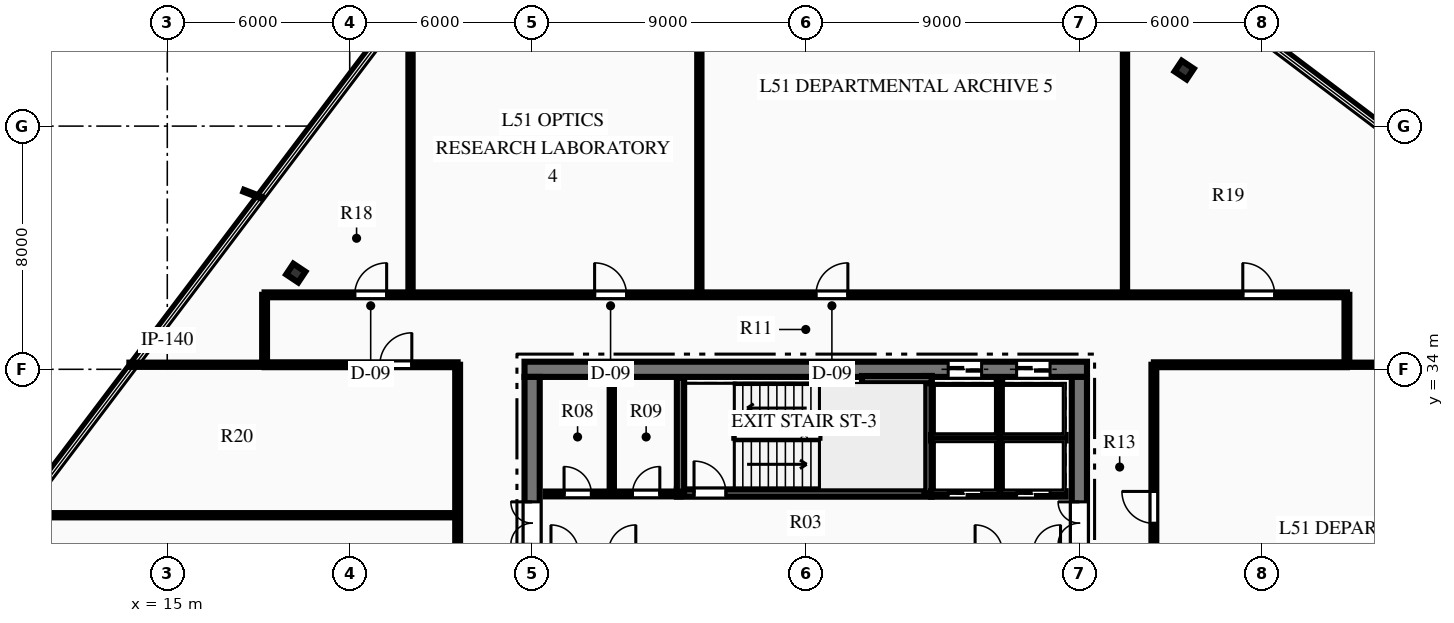
"""IFC4 building model, lengths in metres.
Left out: names, types, materials, properties, quantities, classifications, styles, units other than length and angle.
Written with IfcOpenShell. Run it as: python <this file> out.ifc"""

import sys

from ifc_helpers import new_model, si_unit, direction, frame, frame_2d, origin, origin_2d, place, context, subcontext, project, spatial, rectangle, i_section, extrude, element, fill, save


model = new_model("IFC4")
c1 = context("Model", 3, precision=1e-05, world=origin(), true_north=direction((0.0, 1.0)))
c2 = subcontext(c1, "Body", "Model", "MODEL_VIEW")
j1 = project(units=[si_unit("LENGTHUNIT", "METRE"), si_unit("PLANEANGLEUNIT", "RADIAN")], contexts=[c1])
p1 = place(None, origin())
s1 = spatial("IfcSite", under=j1, at=p1, CompositionType="ELEMENT")
p2 = place(p1, origin())
s2 = spatial("IfcBuilding", under=s1, at=p2, CompositionType="ELEMENT")
p3 = place(p2, frame((0.0, 0.0, 205.95)))
s3 = spatial("IfcBuildingStorey", under=s2, at=p3, CompositionType="ELEMENT", Elevation=205.95)
p4 = place(p3, frame((26.75, 34.0, 0.0), z_axis=(0.0, 0.0, 1.0), x_axis=(1.0, 0.0, 0.0)))
e1 = element("IfcWall", 1, at=p4, inside=s3, PredefinedType="SHEAR", context=c2, shape_type="SweptSolid", body=[
    extrude(rectangle(XDim=18.5, YDim=0.5, at=frame_2d((9.25, 0.0))), origin(), (0.0, 0.0, 1.0), 3.75),
])
p5 = place(p4, frame((13.935, 0.0, 0.0)))
e2 = element("IfcOpeningElement", 2, at=p5, cuts=e1, PredefinedType="OPENING", context=c2, shape_type="SweptSolid", body=[
    extrude(rectangle(XDim=1.1, YDim=2.15, at=frame_2d((0.55, 1.075))), frame((0.0, 0.26, 0.0), z_axis=(0.0, -1.0, 0.0), x_axis=(1.0, 0.0, 0.0)), (0.0, 0.0, 1.0), 0.52),
])
p6 = place(p4, frame((16.185, 0.0, 0.0)))
e3 = element("IfcOpeningElement", 3, at=p6, cuts=e1, PredefinedType="OPENING", context=c2, shape_type="SweptSolid", body=[
    extrude(rectangle(XDim=1.1, YDim=2.15, at=frame_2d((0.55, 1.075))), frame((0.0, 0.26, 0.0), z_axis=(0.0, -1.0, 0.0), x_axis=(1.0, 0.0, 0.0)), (0.0, 0.0, 1.0), 0.52),
])
p7 = place(p3, frame((27.0, 18.25, 0.0), z_axis=(0.0, 0.0, 1.0), x_axis=(0.0, 1.0, 0.0)))
e4 = element("IfcWall", 4, at=p7, inside=s3, PredefinedType="SHEAR", context=c2, shape_type="SweptSolid", body=[
    extrude(rectangle(XDim=15.5, YDim=0.5, at=frame_2d((7.75, 0.0))), origin(), (0.0, 0.0, 1.0), 3.75),
])
p8 = place(p7, frame((9.99, 0.0, 0.0)))
e5 = element("IfcOpeningElement", 5, at=p8, cuts=e4, PredefinedType="OPENING", context=c2, shape_type="SweptSolid", body=[
    extrude(rectangle(XDim=1.4, YDim=2.2, at=frame_2d((0.7, 1.1))), frame((0.0, 0.26, 0.0), z_axis=(0.0, -1.0, 0.0), x_axis=(1.0, 0.0, 0.0)), (0.0, 0.0, 1.0), 0.52),
])
p9 = place(p3, frame((45.0, 18.25, 0.0), z_axis=(0.0, 0.0, 1.0), x_axis=(0.0, 1.0, 0.0)))
e6 = element("IfcWall", 6, at=p9, inside=s3, PredefinedType="SHEAR", context=c2, shape_type="SweptSolid", body=[
    extrude(rectangle(XDim=15.5, YDim=0.5, at=frame_2d((7.75, 0.0))), origin(), (0.0, 0.0, 1.0), 3.75),
])
p10 = place(p9, frame((9.99, 0.0, 0.0)))
e7 = element("IfcOpeningElement", 7, at=p10, cuts=e6, PredefinedType="OPENING", context=c2, shape_type="SweptSolid", body=[
    extrude(rectangle(XDim=1.4, YDim=2.2, at=frame_2d((0.7, 1.1))), frame((0.0, 0.26, 0.0), z_axis=(0.0, -1.0, 0.0), x_axis=(1.0, 0.0, 0.0)), (0.0, 0.0, 1.0), 0.52),
])
p11 = place(p3, frame((31.76, 29.93, 0.0), z_axis=(0.0, 0.0, 1.0), x_axis=(1.0, 0.0, 0.0)))
e8 = element("IfcWall", 8, at=p11, inside=s3, PredefinedType="SHEAR", context=c2, shape_type="SweptSolid", body=[
    extrude(rectangle(XDim=8.38, YDim=0.24, at=frame_2d((4.19, 0.0))), origin(), (0.0, 0.0, 1.0), 3.75),
])
p12 = place(p11, frame((0.565, 0.0, 0.0)))
e9 = element("IfcOpeningElement", 9, at=p12, cuts=e8, PredefinedType="OPENING", context=c2, shape_type="SweptSolid", body=[
    extrude(rectangle(XDim=1.05, YDim=2.15, at=frame_2d((0.525, 1.075))), frame((0.0, 0.13, 0.0), z_axis=(0.0, -1.0, 0.0), x_axis=(1.0, 0.0, 0.0)), (0.0, 0.0, 1.0), 0.26),
])
p13 = place(p3, frame((31.88, 29.93, 0.0), z_axis=(0.0, 0.0, 1.0), x_axis=(0.0, 1.0, 0.0)))
e10 = element("IfcWall", 10, at=p13, inside=s3, PredefinedType="SHEAR", context=c2, shape_type="SweptSolid", body=[
    extrude(rectangle(XDim=3.79, YDim=0.24, at=frame_2d((1.895, 0.0))), origin(), (0.0, 0.0, 1.0), 3.75),
])
p14 = place(p3, frame((40.02, 29.93, 0.0), z_axis=(0.0, 0.0, 1.0), x_axis=(0.0, 1.0, 0.0)))
e11 = element("IfcWall", 11, at=p14, inside=s3, PredefinedType="SHEAR", context=c2, shape_type="SweptSolid", body=[
    extrude(rectangle(XDim=3.85, YDim=0.24, at=frame_2d((1.925, 0.0))), origin(), (0.0, 0.0, 1.0), 3.75),
])
p15 = place(p3, frame((37.85, 33.66, 0.0), z_axis=(0.0, 0.0, 1.0), x_axis=(1.0, 0.0, 0.0)))
e12 = element("IfcWall", 12, at=p15, inside=s3, PredefinedType="SHEAR", context=c2, shape_type="SweptSolid", body=[
    extrude(rectangle(XDim=2.29, YDim=0.24, at=frame_2d((1.145, 0.0))), origin(), (0.0, 0.0, 1.0), 3.75),
])
for number, where, z_axis, x_axis in (
    (13, (48.448, 43.842, 0.0), (0.0, 0.0, 1.0), (0.554, 0.832, 0.0)),
    (14, (19.226, 37.166, 0.0), (0.0, 0.0, 1.0), (0.554, 0.832, 0.0)),
):
    element("IfcColumn", number, at=place(p3, frame(where, z_axis=z_axis, x_axis=x_axis)), inside=s3, PredefinedType="COLUMN", context=c2, shape_type="SweptSolid", body=[
        extrude(i_section(OverallWidth=0.424, OverallDepth=0.474, WebThickness=0.048, FlangeThickness=0.077, at=origin_2d()), origin(), (0.0, 0.0, 1.0), 3.75),
    ])
p16 = place(p3, frame((27.45, 29.9, 0.0), z_axis=(0.0, 0.0, 1.0), x_axis=(1.0, 0.0, 0.0)))
e15 = element("IfcWall", 15, at=p16, inside=s3, PredefinedType="PARTITIONING", context=c2, shape_type="SweptSolid", body=[
    extrude(rectangle(XDim=4.43, YDim=0.16, at=frame_2d((2.215, 0.0))), origin(), (0.0, 0.0, 1.0), 3.47),
])
p17 = place(p16, frame((0.6, 0.0, 0.0)))
e16 = element("IfcOpeningElement", 16, at=p17, cuts=e15, PredefinedType="OPENING", context=c2, shape_type="SweptSolid", body=[
    extrude(rectangle(XDim=0.9, YDim=2.15, at=frame_2d((0.45, 1.075))), frame((0.0, 0.09, 0.0), z_axis=(0.0, -1.0, 0.0), x_axis=(1.0, 0.0, 0.0)), (0.0, 0.0, 1.0), 0.18),
])
p18 = place(p16, frame((2.85, 0.0, 0.0)))
e17 = element("IfcOpeningElement", 17, at=p18, cuts=e15, PredefinedType="OPENING", context=c2, shape_type="SweptSolid", body=[
    extrude(rectangle(XDim=0.9, YDim=2.15, at=frame_2d((0.45, 1.075))), frame((0.0, 0.09, 0.0), z_axis=(0.0, -1.0, 0.0), x_axis=(1.0, 0.0, 0.0)), (0.0, 0.0, 1.0), 0.18),
])
p19 = place(p3, frame((29.62, 29.95, 0.0), z_axis=(0.0, 0.0, 1.0), x_axis=(0.0, 1.0, 0.0)))
e18 = element("IfcWall", 18, at=p19, inside=s3, PredefinedType="PARTITIONING", context=c2, shape_type="SweptSolid", body=[
    extrude(rectangle(XDim=3.6, YDim=0.14, at=frame_2d((1.8, 0.0))), origin(), (0.0, 0.0, 1.0), 3.47),
])
p20 = place(p3, frame((40.12, 29.9, 0.0), z_axis=(0.0, 0.0, 1.0), x_axis=(1.0, 0.0, 0.0)))
e19 = element("IfcWall", 19, at=p20, inside=s3, PredefinedType="PARTITIONING", context=c2, shape_type="SweptSolid", body=[
    extrude(rectangle(XDim=4.43, YDim=0.18, at=frame_2d((2.215, 0.0))), origin(), (0.0, 0.0, 1.0), 3.47),
])
p21 = place(p20, frame((0.565, 0.0, 0.0)))
e20 = element("IfcOpeningElement", 20, at=p21, cuts=e19, PredefinedType="OPENING", context=c2, shape_type="SweptSolid", body=[
    extrude(rectangle(XDim=1.1, YDim=2.15, at=frame_2d((0.55, 1.075))), frame((0.0, 0.1, 0.0), z_axis=(0.0, -1.0, 0.0), x_axis=(1.0, 0.0, 0.0)), (0.0, 0.0, 1.0), 0.2),
])
p22 = place(p20, frame((2.815, 0.0, 0.0)))
e21 = element("IfcOpeningElement", 21, at=p22, cuts=e19, PredefinedType="OPENING", context=c2, shape_type="SweptSolid", body=[
    extrude(rectangle(XDim=1.1, YDim=2.15, at=frame_2d((0.55, 1.075))), frame((0.0, 0.1, 0.0), z_axis=(0.0, -1.0, 0.0), x_axis=(1.0, 0.0, 0.0)), (0.0, 0.0, 1.0), 0.2),
])
p23 = place(p3, frame((40.12, 31.75, 0.0), z_axis=(0.0, 0.0, 1.0), x_axis=(1.0, 0.0, 0.0)))
e22 = element("IfcWall", 22, at=p23, inside=s3, PredefinedType="PARTITIONING", context=c2, shape_type="SweptSolid", body=[
    extrude(rectangle(XDim=4.43, YDim=0.18, at=frame_2d((2.215, 0.0))), origin(), (0.0, 0.0, 1.0), 3.47),
])
p24 = place(p3, frame((42.37, 29.9, 0.0), z_axis=(0.0, 0.0, 1.0), x_axis=(0.0, 1.0, 0.0)))
e23 = element("IfcWall", 23, at=p24, inside=s3, PredefinedType="PARTITIONING", context=c2, shape_type="SweptSolid", body=[
    extrude(rectangle(XDim=3.75, YDim=0.18, at=frame_2d((1.875, 0.0))), origin(), (0.0, 0.0, 1.0), 3.47),
])
p25 = place(p3, frame((18.2, 36.45, 0.0), z_axis=(0.0, 0.0, 1.0), x_axis=(1.0, 0.0, 0.0)))
e24 = element("IfcWall", 24, at=p25, inside=s3, PredefinedType="PARTITIONING", context=c2, shape_type="SweptSolid", body=[
    extrude(rectangle(XDim=35.6, YDim=0.16, at=frame_2d((17.8, 0.0))), origin(), (0.0, 0.0, 1.0), 2.849),
])
p26 = place(p25, frame((2.965, 0.0, 0.0)))
e25 = element("IfcOpeningElement", 25, at=p26, cuts=e24, PredefinedType="OPENING", context=c2, shape_type="SweptSolid", body=[
    extrude(rectangle(XDim=1.05, YDim=2.15, at=frame_2d((0.525, 1.075))), frame((0.0, 0.09, 0.0), z_axis=(0.0, -1.0, 0.0), x_axis=(1.0, 0.0, 0.0)), (0.0, 0.0, 1.0), 0.18),
])
p27 = place(p25, frame((10.855, 0.0, 0.0)))
e26 = element("IfcOpeningElement", 26, at=p27, cuts=e24, PredefinedType="OPENING", context=c2, shape_type="SweptSolid", body=[
    extrude(rectangle(XDim=1.05, YDim=2.15, at=frame_2d((0.525, 1.075))), frame((0.0, 0.09, 0.0), z_axis=(0.0, -1.0, 0.0), x_axis=(1.0, 0.0, 0.0)), (0.0, 0.0, 1.0), 0.18),
])
p28 = place(p25, frame((18.135, 0.0, 0.0)))
e27 = element("IfcOpeningElement", 27, at=p28, cuts=e24, PredefinedType="OPENING", context=c2, shape_type="SweptSolid", body=[
    extrude(rectangle(XDim=1.05, YDim=2.15, at=frame_2d((0.525, 1.075))), frame((0.0, 0.09, 0.0), z_axis=(0.0, -1.0, 0.0), x_axis=(1.0, 0.0, 0.0)), (0.0, 0.0, 1.0), 0.18),
])
p29 = place(p25, frame((32.175, 0.0, 0.0)))
e28 = element("IfcOpeningElement", 28, at=p29, cuts=e24, PredefinedType="OPENING", context=c2, shape_type="SweptSolid", body=[
    extrude(rectangle(XDim=1.05, YDim=2.15, at=frame_2d((0.525, 1.075))), frame((0.0, 0.09, 0.0), z_axis=(0.0, -1.0, 0.0), x_axis=(1.0, 0.0, 0.0)), (0.0, 0.0, 1.0), 0.18),
])
p30 = place(p3, frame((18.2, 34.15, 0.0), z_axis=(0.0, 0.0, 1.0), x_axis=(1.0, 0.0, 0.0)))
e29 = element("IfcWall", 29, at=p30, inside=s3, PredefinedType="PARTITIONING", context=c2, shape_type="SweptSolid", body=[
    extrude(rectangle(XDim=6.35, YDim=0.16, at=frame_2d((3.175, 0.0))), origin(), (0.0, 0.0, 1.0), 3.47),
])
p31 = place(p30, frame((3.793, 0.0, 0.0)))
e30 = element("IfcOpeningElement", 30, at=p31, cuts=e29, PredefinedType="OPENING", context=c2, shape_type="SweptSolid", body=[
    extrude(rectangle(XDim=1.05, YDim=2.15, at=frame_2d((0.525, 1.075))), frame((0.0, 0.09, 0.0), z_axis=(0.0, -1.0, 0.0), x_axis=(1.0, 0.0, 0.0)), (0.0, 0.0, 1.0), 0.18),
])
p32 = place(p3, frame((47.45, 34.15, 0.0), z_axis=(0.0, 0.0, 1.0), x_axis=(1.0, 0.0, 0.0)))
e31 = element("IfcWall", 31, at=p32, inside=s3, PredefinedType="PARTITIONING", context=c2, shape_type="SweptSolid", body=[
    extrude(rectangle(XDim=6.35, YDim=0.16, at=frame_2d((3.175, 0.0))), origin(), (0.0, 0.0, 1.0), 3.47),
])
p33 = place(p3, frame((24.55, 17.85, 0.0), z_axis=(0.0, 0.0, 1.0), x_axis=(0.0, 1.0, 0.0)))
e32 = element("IfcWall", 32, at=p33, inside=s3, PredefinedType="PARTITIONING", context=c2, shape_type="SweptSolid", body=[
    extrude(rectangle(XDim=16.3, YDim=0.16, at=frame_2d((8.15, 0.0))), origin(), (0.0, 0.0, 1.0), 3.47),
])
p34 = place(p33, frame((6.149, 0.0, 0.0)))
e33 = element("IfcOpeningElement", 33, at=p34, cuts=e32, PredefinedType="OPENING", context=c2, shape_type="SweptSolid", body=[
    extrude(rectangle(XDim=1.05, YDim=2.15, at=frame_2d((0.525, 1.075))), frame((0.0, 0.09, 0.0), z_axis=(0.0, -1.0, 0.0), x_axis=(1.0, 0.0, 0.0)), (0.0, 0.0, 1.0), 0.18),
])
p35 = place(p3, frame((47.45, 27.25, 0.0), z_axis=(0.0, 0.0, 1.0), x_axis=(0.0, 1.0, 0.0)))
e34 = element("IfcWall", 34, at=p35, inside=s3, PredefinedType="PARTITIONING", context=c2, shape_type="SweptSolid", body=[
    extrude(rectangle(XDim=6.9, YDim=0.16, at=frame_2d((3.45, 0.0))), origin(), (0.0, 0.0, 1.0), 3.47),
])
p36 = place(p35, frame((1.683, 0.0, 0.0)))
e35 = element("IfcOpeningElement", 35, at=p36, cuts=e34, PredefinedType="OPENING", context=c2, shape_type="SweptSolid", body=[
    extrude(rectangle(XDim=1.05, YDim=2.15, at=frame_2d((0.525, 1.075))), frame((0.0, 0.09, 0.0), z_axis=(0.0, -1.0, 0.0), x_axis=(1.0, 0.0, 0.0)), (0.0, 0.0, 1.0), 0.18),
])
for number, where, z_axis, x_axis in (
    (36, (18.2, 34.15, 0.0), (0.0, 0.0, 1.0), (0.0, 1.0, 0.0)),
    (37, (53.8, 34.15, 0.0), (0.0, 0.0, 1.0), (0.0, 1.0, 0.0)),
):
    element("IfcWall", number, at=place(p3, frame(where, z_axis=z_axis, x_axis=x_axis)), inside=s3, PredefinedType="PARTITIONING", context=c2, shape_type="SweptSolid", body=[
        extrude(rectangle(XDim=2.3, YDim=0.16, at=frame_2d((1.15, 0.0))), origin(), (0.0, 0.0, 1.0), 3.47),
    ])
p37 = place(p3, frame((13.753, 34.15, 0.0), z_axis=(0.0, 0.0, 1.0), x_axis=(1.0, 0.0, 0.0)))
e38 = element("IfcWall", 38, at=p37, inside=s3, PredefinedType="PARTITIONING", context=c2, shape_type="SweptSolid", body=[
    extrude(rectangle(XDim=4.447, YDim=0.14, at=frame_2d((2.224, 0.0))), origin(), (0.0, 0.0, 1.0), 3.47),
])
p38 = place(p3, frame((53.8, 34.15, 0.0), z_axis=(0.0, 0.0, 1.0), x_axis=(1.0, 0.0, 0.0)))
e39 = element("IfcWall", 39, at=p38, inside=s3, PredefinedType="PARTITIONING", context=c2, shape_type="SweptSolid", body=[
    extrude(rectangle(XDim=11.642, YDim=0.14, at=frame_2d((5.821, 0.0))), origin(), (0.0, 0.0, 1.0), 3.47),
])
p39 = place(p3, frame((23.0, 36.45, 0.0), z_axis=(0.0, 0.0, 1.0), x_axis=(0.0, 1.0, 0.0)))
e40 = element("IfcWall", 40, at=p39, inside=s3, PredefinedType="PARTITIONING", context=c2, shape_type="SweptSolid", body=[
    extrude(rectangle(XDim=9.927, YDim=0.14, at=frame_2d((4.963, 0.0))), origin(), (0.0, 0.0, 1.0), 3.47),
])
p40 = place(p3, frame((32.5, 36.45, 0.0), z_axis=(0.0, 0.0, 1.0), x_axis=(0.0, 1.0, 0.0)))
e41 = element("IfcWall", 41, at=p40, inside=s3, PredefinedType="PARTITIONING", context=c2, shape_type="SweptSolid", body=[
    extrude(rectangle(XDim=17.724, YDim=0.14, at=frame_2d((8.862, 0.0))), origin(), (0.0, 0.0, 1.0), 2.849),
])
p41 = place(p3, frame((46.5, 36.45, 0.0), z_axis=(0.0, 0.0, 1.0), x_axis=(0.0, 1.0, 0.0)))
e42 = element("IfcWall", 42, at=p41, inside=s3, PredefinedType="PARTITIONING", context=c2, shape_type="SweptSolid", body=[
    extrude(rectangle(XDim=12.026, YDim=0.14, at=frame_2d((6.013, 0.0))), origin(), (0.0, 0.0, 1.0), 2.849),
])
p42 = place(p3, frame((10.009, 29.2, 0.0), z_axis=(0.0, 0.0, 1.0), x_axis=(1.0, 0.0, 0.0)))
e43 = element("IfcWall", 43, at=p42, inside=s3, PredefinedType="PARTITIONING", context=c2, shape_type="SweptSolid", body=[
    extrude(rectangle(XDim=14.541, YDim=0.14, at=frame_2d((7.271, 0.0))), origin(), (0.0, 0.0, 1.0), 3.47),
])
p43 = place(p17, origin())
e44 = element("IfcDoor", 44, at=p43, inside=s3, OperationType="SINGLE_SWING_LEFT", PredefinedType="DOOR", context=c2, shape_type="SweptSolid", body=[
    extrude(rectangle(XDim=0.9, YDim=2.15, at=frame_2d((0.45, 1.075))), frame((0.0, 0.025, 0.0), z_axis=(0.0, -1.0, 0.0), x_axis=(1.0, 0.0, 0.0)), (0.0, 0.0, 1.0), 0.05),
])
fill(e16, e44)
p44 = place(p18, origin())
e45 = element("IfcDoor", 45, at=p44, inside=s3, OperationType="SINGLE_SWING_RIGHT", PredefinedType="DOOR", context=c2, shape_type="SweptSolid", body=[
    extrude(rectangle(XDim=0.9, YDim=2.15, at=frame_2d((0.45, 1.075))), frame((0.0, 0.025, 0.0), z_axis=(0.0, -1.0, 0.0), x_axis=(1.0, 0.0, 0.0)), (0.0, 0.0, 1.0), 0.05),
])
fill(e17, e45)
p45 = place(p12, origin())
e46 = element("IfcDoor", 46, at=p45, inside=s3, OperationType="SINGLE_SWING_LEFT", PredefinedType="DOOR", context=c2, shape_type="SweptSolid", body=[
    extrude(rectangle(XDim=1.05, YDim=2.15, at=frame_2d((0.525, 1.075))), frame((0.0, 0.025, 0.0), z_axis=(0.0, -1.0, 0.0), x_axis=(1.0, 0.0, 0.0)), (0.0, 0.0, 1.0), 0.05),
])
fill(e9, e46)
p46 = place(p8, origin())
e47 = element("IfcDoor", 47, at=p46, inside=s3, OperationType="DOUBLE_DOOR_SINGLE_SWING", PredefinedType="DOOR", context=c2, shape_type="SweptSolid", body=[
    extrude(rectangle(XDim=1.4, YDim=2.2, at=frame_2d((0.7, 1.1))), frame((0.0, 0.025, 0.0), z_axis=(0.0, -1.0, 0.0), x_axis=(1.0, 0.0, 0.0)), (0.0, 0.0, 1.0), 0.05),
])
fill(e5, e47)
p47 = place(p10, origin())
e48 = element("IfcDoor", 48, at=p47, inside=s3, OperationType="DOUBLE_DOOR_SINGLE_SWING", PredefinedType="DOOR", context=c2, shape_type="SweptSolid", body=[
    extrude(rectangle(XDim=1.4, YDim=2.2, at=frame_2d((0.7, 1.1))), frame((0.0, 0.025, 0.0), z_axis=(0.0, -1.0, 0.0), x_axis=(1.0, 0.0, 0.0)), (0.0, 0.0, 1.0), 0.05),
])
fill(e7, e48)
p48 = place(p26, origin())
e49 = element("IfcDoor", 49, at=p48, inside=s3, OperationType="SINGLE_SWING_RIGHT", PredefinedType="DOOR", context=c2, shape_type="SweptSolid", body=[
    extrude(rectangle(XDim=1.05, YDim=2.15, at=frame_2d((0.525, 1.075))), frame((0.0, 0.025, 0.0), z_axis=(0.0, -1.0, 0.0), x_axis=(1.0, 0.0, 0.0)), (0.0, 0.0, 1.0), 0.05),
])
fill(e25, e49)
p49 = place(p27, origin())
e50 = element("IfcDoor", 50, at=p49, inside=s3, OperationType="SINGLE_SWING_LEFT", PredefinedType="DOOR", context=c2, shape_type="SweptSolid", body=[
    extrude(rectangle(XDim=1.05, YDim=2.15, at=frame_2d((0.525, 1.075))), frame((0.0, 0.025, 0.0), z_axis=(0.0, -1.0, 0.0), x_axis=(1.0, 0.0, 0.0)), (0.0, 0.0, 1.0), 0.05),
])
fill(e26, e50)
p50 = place(p28, origin())
e51 = element("IfcDoor", 51, at=p50, inside=s3, OperationType="SINGLE_SWING_RIGHT", PredefinedType="DOOR", context=c2, shape_type="SweptSolid", body=[
    extrude(rectangle(XDim=1.05, YDim=2.15, at=frame_2d((0.525, 1.075))), frame((0.0, 0.025, 0.0), z_axis=(0.0, -1.0, 0.0), x_axis=(1.0, 0.0, 0.0)), (0.0, 0.0, 1.0), 0.05),
])
fill(e27, e51)
p51 = place(p29, origin())
e52 = element("IfcDoor", 52, at=p51, inside=s3, OperationType="SINGLE_SWING_LEFT", PredefinedType="DOOR", context=c2, shape_type="SweptSolid", body=[
    extrude(rectangle(XDim=1.05, YDim=2.15, at=frame_2d((0.525, 1.075))), frame((0.0, 0.025, 0.0), z_axis=(0.0, -1.0, 0.0), x_axis=(1.0, 0.0, 0.0)), (0.0, 0.0, 1.0), 0.05),
])
fill(e28, e52)
p52 = place(p31, origin())
e53 = element("IfcDoor", 53, at=p52, inside=s3, OperationType="SINGLE_SWING_RIGHT", PredefinedType="DOOR", context=c2, shape_type="SweptSolid", body=[
    extrude(rectangle(XDim=1.05, YDim=2.15, at=frame_2d((0.525, 1.075))), frame((0.0, 0.025, 0.0), z_axis=(0.0, -1.0, 0.0), x_axis=(1.0, 0.0, 0.0)), (0.0, 0.0, 1.0), 0.05),
])
fill(e30, e53)
p53 = place(p36, origin())
e54 = element("IfcDoor", 54, at=p53, inside=s3, OperationType="SINGLE_SWING_RIGHT", PredefinedType="DOOR", context=c2, shape_type="SweptSolid", body=[
    extrude(rectangle(XDim=1.05, YDim=2.15, at=frame_2d((0.525, 1.075))), frame((0.0, 0.025, 0.0), z_axis=(0.0, -1.0, 0.0), x_axis=(1.0, 0.0, 0.0)), (0.0, 0.0, 1.0), 0.05),
])
fill(e35, e54)
p54 = place(p21, origin())
e55 = element("IfcDoor", 55, at=p54, inside=s3, OperationType="SLIDING_TO_LEFT", PredefinedType="DOOR", context=c2, shape_type="SweptSolid", body=[
    extrude(rectangle(XDim=1.1, YDim=2.15, at=frame_2d((0.55, 1.075))), frame((0.0, 0.025, 0.0), z_axis=(0.0, -1.0, 0.0), x_axis=(1.0, 0.0, 0.0)), (0.0, 0.0, 1.0), 0.05),
])
fill(e20, e55)
p55 = place(p22, origin())
e56 = element("IfcDoor", 56, at=p55, inside=s3, OperationType="SLIDING_TO_LEFT", PredefinedType="DOOR", context=c2, shape_type="SweptSolid", body=[
    extrude(rectangle(XDim=1.1, YDim=2.15, at=frame_2d((0.55, 1.075))), frame((0.0, 0.025, 0.0), z_axis=(0.0, -1.0, 0.0), x_axis=(1.0, 0.0, 0.0)), (0.0, 0.0, 1.0), 0.05),
])
fill(e21, e56)
p56 = place(p5, origin())
e57 = element("IfcDoor", 57, at=p56, inside=s3, OperationType="SLIDING_TO_LEFT", PredefinedType="DOOR", context=c2, shape_type="SweptSolid", body=[
    extrude(rectangle(XDim=1.1, YDim=2.15, at=frame_2d((0.55, 1.075))), frame((0.0, 0.025, 0.0), z_axis=(0.0, -1.0, 0.0), x_axis=(1.0, 0.0, 0.0)), (0.0, 0.0, 1.0), 0.05),
])
fill(e2, e57)
p57 = place(p6, origin())
e58 = element("IfcDoor", 58, at=p57, inside=s3, OperationType="SLIDING_TO_LEFT", PredefinedType="DOOR", context=c2, shape_type="SweptSolid", body=[
    extrude(rectangle(XDim=1.1, YDim=2.15, at=frame_2d((0.55, 1.075))), frame((0.0, 0.025, 0.0), z_axis=(0.0, -1.0, 0.0), x_axis=(1.0, 0.0, 0.0)), (0.0, 0.0, 1.0), 0.05),
])
fill(e3, e58)
save(model, sys.argv[1])
